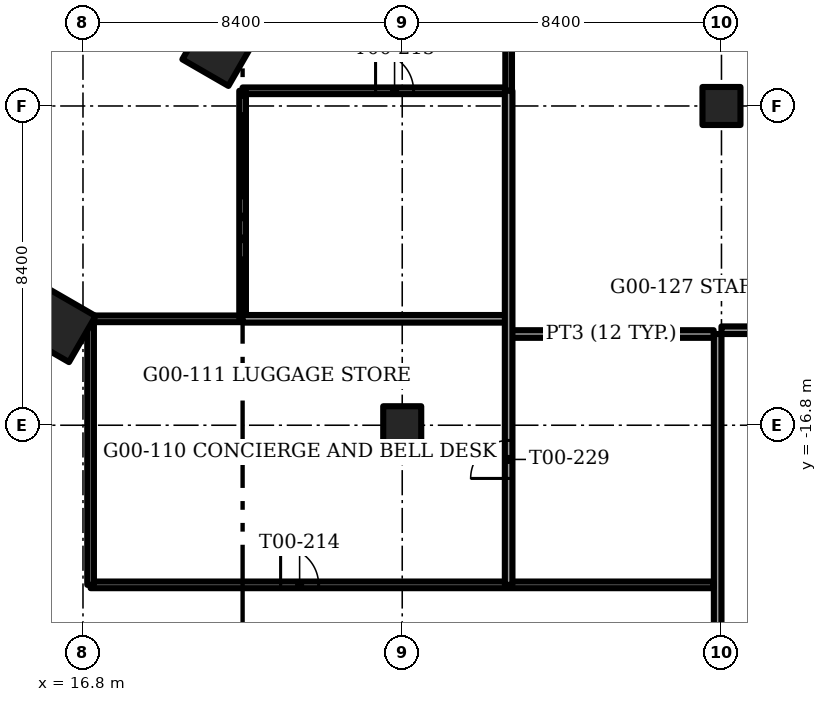
"""IFC4 building model, lengths in metres.
Left out: names, types, materials, properties, quantities, classifications, styles, units other than length and angle.
Written with IfcOpenShell. Run it as: python <this file> out.ifc"""

import sys

from ifc_helpers import new_model, si_unit, direction, frame, frame_2d, origin, origin_2d, place, context, subcontext, project, spatial, rectangle, extrude, element, fill, save


model = new_model("IFC4")
c1 = context("Model", 3, precision=1e-05, world=origin(), true_north=direction((0.0, 1.0)))
c2 = subcontext(c1, "Body", "Model", "MODEL_VIEW")
j1 = project(units=[si_unit("LENGTHUNIT", "METRE"), si_unit("PLANEANGLEUNIT", "RADIAN")], contexts=[c1])
p1 = place(None, origin())
s1 = spatial("IfcSite", under=j1, at=p1, CompositionType="ELEMENT")
p2 = place(p1, origin())
s2 = spatial("IfcBuilding", under=s1, at=p2, CompositionType="ELEMENT")
p3 = place(p2, origin())
s3 = spatial("IfcBuildingStorey", under=s2, at=p3, CompositionType="ELEMENT", Elevation=0.0)
for number, where, z_axis, x_axis in (
    (1, (25.2, -16.8, -0.35), (0.0, 0.0, 1.0), (1.0, 0.0, 0.0)),
    (2, (33.6, -8.4, -0.35), (0.0, 0.0, 1.0), (1.0, 0.0, 0.0)),
):
    element("IfcColumn", number, at=place(p3, frame(where, z_axis=z_axis, x_axis=x_axis)), inside=s3, PredefinedType="COLUMN", context=c2, shape_type="SweptSolid", body=[
        extrude(rectangle(XDim=1.0, YDim=1.0, at=origin_2d()), origin(), (0.0, 0.0, 1.0), 6.0),
    ])
for number, where, z_axis, x_axis in (
    (3, (16.175, -14.183, -0.35), (0.0, 0.0, 1.0), (-0.5, -0.866, 0.0)),
    (4, (20.371, -6.917, -0.35), (0.0, 0.0, 1.0), (-0.5, -0.866, 0.0)),
):
    element("IfcColumn", number, at=place(p3, frame(where, z_axis=z_axis, x_axis=x_axis)), inside=s3, PredefinedType="COLUMN", context=c2, shape_type="SweptSolid", body=[
        extrude(rectangle(XDim=1.4, YDim=1.4, at=origin_2d()), origin(), (0.0, 0.0, 1.0), 5.15),
    ])
p4 = place(p3, frame((39.4, -14.3, 0.0), z_axis=(0.0, 0.0, 1.0), x_axis=(-1.0, 0.0, 0.0)))
e5 = element("IfcWall", 5, at=p4, inside=s3, PredefinedType="PARAPET", context=c2, shape_type="SweptSolid", body=[
    extrude(rectangle(XDim=5.8, YDim=0.2, at=frame_2d((2.9, 0.0))), origin(), (0.0, 0.0, 1.0), 1.1),
])
p5 = place(p3, frame((33.5, -14.4, 0.0), z_axis=(0.0, 0.0, 1.0), x_axis=(0.0, -1.0, 0.0)))
e6 = element("IfcWall", 6, at=p5, inside=s3, PredefinedType="PARAPET", context=c2, shape_type="SweptSolid", body=[
    extrude(rectangle(XDim=36.0, YDim=0.2, at=frame_2d((18.0, 0.0))), origin(), (0.0, 0.0, 1.0), 1.1),
])
p6 = place(p3, frame((17.0, -21.0, 0.0), z_axis=(0.0, 0.0, 1.0), x_axis=(1.0, 0.0, 0.0)))
e7 = element("IfcWall", 7, at=p6, inside=s3, PredefinedType="PARTITIONING", context=c2, shape_type="SweptSolid", body=[
    extrude(rectangle(XDim=16.395, YDim=0.175, at=frame_2d((8.198, 0.0))), origin(), (0.0, 0.0, 1.0), 5.65),
])
p7 = place(p6, frame((5.0, 0.0, 0.0)))
e8 = element("IfcOpeningElement", 8, at=p7, cuts=e7, PredefinedType="OPENING", context=c2, shape_type="SweptSolid", body=[
    extrude(rectangle(XDim=1.0, YDim=2.1, at=frame_2d((0.5, 1.05))), frame((0.0, 0.087, 0.0), z_axis=(0.0, -1.0, 0.0), x_axis=(1.0, 0.0, 0.0)), (0.0, 0.0, 1.0), 0.175),
])
p8 = place(p3, frame((17.0, -14.0, 0.0), z_axis=(0.0, 0.0, 1.0), x_axis=(1.0, 0.0, 0.0)))
e9 = element("IfcWall", 9, at=p8, inside=s3, PredefinedType="PARTITIONING", context=c2, shape_type="SweptSolid", body=[
    extrude(rectangle(XDim=4.0, YDim=0.175, at=frame_2d((2.0, 0.0))), origin(), (0.0, 0.0, 1.0), 5.65),
])
p9 = place(p3, frame((21.0, -8.0, 0.0), z_axis=(0.0, 0.0, 1.0), x_axis=(1.0, 0.0, 0.0)))
e10 = element("IfcWall", 10, at=p9, inside=s3, PredefinedType="PARTITIONING", context=c2, shape_type="SweptSolid", body=[
    extrude(rectangle(XDim=7.0, YDim=0.175, at=frame_2d((3.5, 0.0))), origin(), (0.0, 0.0, 1.0), 5.65),
])
p10 = place(p9, frame((3.499, 0.0, 0.0)))
e11 = element("IfcOpeningElement", 11, at=p10, cuts=e10, PredefinedType="OPENING", context=c2, shape_type="SweptSolid", body=[
    extrude(rectangle(XDim=1.0, YDim=2.1, at=frame_2d((0.5, 1.05))), frame((0.0, 0.087, 0.0), z_axis=(0.0, -1.0, 0.0), x_axis=(1.0, 0.0, 0.0)), (0.0, 0.0, 1.0), 0.175),
])
p11 = place(p3, frame((17.0, -21.0, 0.0), z_axis=(0.0, 0.0, 1.0), x_axis=(0.0, 1.0, 0.0)))
e12 = element("IfcWall", 12, at=p11, inside=s3, PredefinedType="PARTITIONING", context=c2, shape_type="SweptSolid", body=[
    extrude(rectangle(XDim=7.0, YDim=0.175, at=frame_2d((3.5, 0.0))), origin(), (0.0, 0.0, 1.0), 5.65),
])
p12 = place(p3, frame((21.0, -14.0, 0.0), z_axis=(0.0, 0.0, 1.0), x_axis=(0.0, 1.0, 0.0)))
e13 = element("IfcWall", 13, at=p12, inside=s3, PredefinedType="PARTITIONING", context=c2, shape_type="SweptSolid", body=[
    extrude(rectangle(XDim=6.0, YDim=0.175, at=frame_2d((3.0, 0.0))), origin(), (0.0, 0.0, 1.0), 5.65),
])
p13 = place(p3, frame((28.0, -8.0, 0.0), z_axis=(0.0, 0.0, 1.0), x_axis=(0.0, 1.0, 0.0)))
e14 = element("IfcWall", 14, at=p13, inside=s3, PredefinedType="PARTITIONING", context=c2, shape_type="SweptSolid", body=[
    extrude(rectangle(XDim=24.8, YDim=0.175, at=frame_2d((12.4, 0.0))), origin(), (0.0, 0.0, 1.0), 5.65),
])
p14 = place(p13, frame((21.95, 0.0, 0.0)))
e15 = element("IfcOpeningElement", 15, at=p14, cuts=e14, PredefinedType="OPENING", context=c2, shape_type="SweptSolid", body=[
    extrude(rectangle(XDim=0.9, YDim=2.1, at=frame_2d((0.45, 1.05))), frame((0.0, 0.087, 0.0), z_axis=(0.0, -1.0, 0.0), x_axis=(1.0, 0.0, 0.0)), (0.0, 0.0, 1.0), 0.175),
])
p15 = place(p13, frame((18.5, 0.0, 0.0)))
e16 = element("IfcOpeningElement", 16, at=p15, cuts=e14, PredefinedType="OPENING", context=c2, shape_type="SweptSolid", body=[
    extrude(rectangle(XDim=1.0, YDim=2.1, at=frame_2d((0.5, 1.05))), frame((0.0, 0.087, 0.0), z_axis=(0.0, -1.0, 0.0), x_axis=(1.0, 0.0, 0.0)), (0.0, 0.0, 1.0), 0.175),
])
p16 = place(p3, frame((28.0, -14.4, 0.0), z_axis=(0.0, 0.0, 1.0), x_axis=(1.0, 0.0, 0.0)))
e17 = element("IfcWall", 17, at=p16, inside=s3, PredefinedType="PARTITIONING", context=c2, shape_type="SweptSolid", body=[
    extrude(rectangle(XDim=5.395, YDim=0.2, at=frame_2d((2.698, 0.0))), origin(), (0.0, 0.0, 1.0), 5.65),
])
p17 = place(p3, frame((21.0, -14.0, 0.0), z_axis=(0.0, 0.0, 1.0), x_axis=(1.0, 0.0, 0.0)))
e18 = element("IfcWall", 18, at=p17, inside=s3, PredefinedType="PARTITIONING", context=c2, shape_type="SweptSolid", body=[
    extrude(rectangle(XDim=7.0, YDim=0.2, at=frame_2d((3.5, 0.0))), origin(), (0.0, 0.0, 1.0), 5.65),
])
p18 = place(p3, frame((28.0, -21.0, 0.0), z_axis=(0.0, 0.0, 1.0), x_axis=(0.0, 1.0, 0.0)))
e19 = element("IfcWall", 19, at=p18, inside=s3, PredefinedType="PARTITIONING", context=c2, shape_type="SweptSolid", body=[
    extrude(rectangle(XDim=13.0, YDim=0.2, at=frame_2d((6.5, 0.0))), origin(), (0.0, 0.0, 1.0), 5.65),
])
p19 = place(p18, frame((2.8, 0.0, 0.0)))
e20 = element("IfcOpeningElement", 20, at=p19, cuts=e19, PredefinedType="OPENING", context=c2, shape_type="SweptSolid", body=[
    extrude(rectangle(XDim=1.0, YDim=2.1, at=frame_2d((0.5, 1.05))), frame((0.0, 0.1, 0.0), z_axis=(0.0, -1.0, 0.0), x_axis=(1.0, 0.0, 0.0)), (0.0, 0.0, 1.0), 0.2),
])
p20 = place(p7, origin())
e21 = element("IfcDoor", 21, at=p20, inside=s3, OperationType="SINGLE_SWING_RIGHT", PredefinedType="DOOR", context=c2, shape_type="SweptSolid", body=[
    extrude(rectangle(XDim=1.0, YDim=2.1, at=frame_2d((0.5, 1.05))), frame((0.0, 0.025, 0.0), z_axis=(0.0, -1.0, 0.0), x_axis=(1.0, 0.0, 0.0)), (0.0, 0.0, 1.0), 0.05),
])
fill(e8, e21)
p21 = place(p10, origin())
e22 = element("IfcDoor", 22, at=p21, inside=s3, OperationType="SINGLE_SWING_LEFT", PredefinedType="DOOR", context=c2, shape_type="SweptSolid", body=[
    extrude(rectangle(XDim=1.0, YDim=2.1, at=frame_2d((0.5, 1.05))), frame((0.0, 0.025, 0.0), z_axis=(0.0, -1.0, 0.0), x_axis=(1.0, 0.0, 0.0)), (0.0, 0.0, 1.0), 0.05),
])
fill(e11, e22)
p22 = place(p19, origin())
e23 = element("IfcDoor", 23, at=p22, inside=s3, OperationType="SINGLE_SWING_LEFT", PredefinedType="DOOR", context=c2, shape_type="SweptSolid", body=[
    extrude(rectangle(XDim=1.0, YDim=2.1, at=frame_2d((0.5, 1.05))), frame((0.0, 0.025, 0.0), z_axis=(0.0, -1.0, 0.0), x_axis=(1.0, 0.0, 0.0)), (0.0, 0.0, 1.0), 0.05),
])
fill(e20, e23)
save(model, sys.argv[1])
